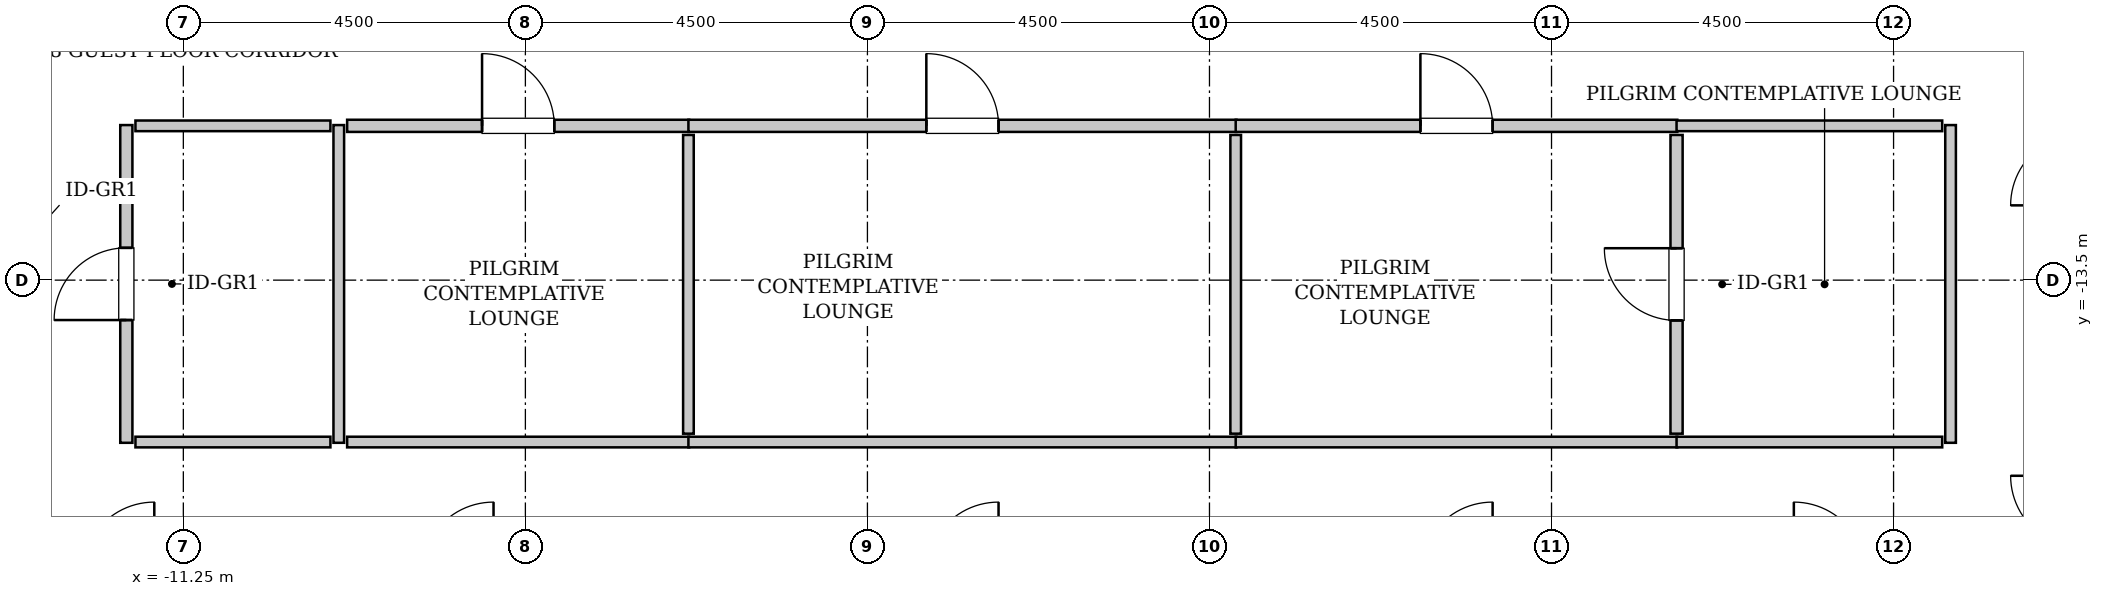
"""IFC4 building model, lengths in metres.
Left out: names, types, materials, properties, quantities, classifications, styles, units other than length and angle.
Written with IfcOpenShell. Run it as: python <this file> out.ifc"""

import sys

from ifc_helpers import new_model, si_unit, direction, frame, frame_2d, origin, place, context, subcontext, project, spatial, rectangle, extrude, source, transform, mapped, element, fill, save


model = new_model("IFC4")
c1 = context("Model", 3, precision=1e-05, world=origin(), true_north=direction((0.0, 1.0)))
c2 = subcontext(c1, "Body", "Model", "MODEL_VIEW")
j1 = project(units=[si_unit("LENGTHUNIT", "METRE"), si_unit("PLANEANGLEUNIT", "RADIAN")], contexts=[c1])
p1 = place(None, origin())
s1 = spatial("IfcSite", under=j1, at=p1, CompositionType="ELEMENT")
p2 = place(p1, origin())
s2 = spatial("IfcBuilding", under=s1, at=p2, CompositionType="ELEMENT")
p3 = place(p2, frame((0.0, 0.0, 156.4)))
s3 = spatial("IfcBuildingStorey", under=s2, at=p3, CompositionType="ELEMENT", Elevation=156.4)
m1 = source(origin(), c2, "Body", "SweptSolid", [
    extrude(rectangle(XDim=4.18, YDim=0.16, at=frame_2d((2.09, 0.0))), origin(), (0.0, 0.0, 1.0), 3.535),
])
p4 = place(p3, frame((-12.0, -15.64, 0.0), z_axis=(0.0, 0.0, 1.0), x_axis=(0.0, 1.0, 0.0)))
e1 = element("IfcWall", 1, at=p4, inside=s3, PredefinedType="PARTITIONING", context=c2, shape_type="MappedRepresentation", body=[
    mapped(m1, transform((0.0, 0.0, 0.0), x_axis=(1.0, 0.0, 0.0), y_axis=(0.0, 1.0, 0.0), z_axis=(0.0, 0.0, 1.0), scale=1.0)),
])
p5 = place(p4, frame((1.615, 0.0, 0.0)))
e2 = element("IfcOpeningElement", 2, at=p5, cuts=e1, PredefinedType="OPENING", context=c2, shape_type="SweptSolid", body=[
    extrude(rectangle(XDim=0.95, YDim=2.1, at=frame_2d((0.475, 1.05))), frame((0.0, 0.09, 0.0), z_axis=(0.0, -1.0, 0.0), x_axis=(1.0, 0.0, 0.0)), (0.0, 0.0, 1.0), 0.18),
])
m2 = source(origin(), c2, "Body", "SweptSolid", [
    extrude(rectangle(XDim=4.18, YDim=0.14, at=frame_2d((2.09, 0.0))), origin(), (0.0, 0.0, 1.0), 3.535),
])
p6 = place(p3, frame((-9.205, -15.64, 0.0), z_axis=(0.0, 0.0, 1.0), x_axis=(0.0, 1.0, 0.0)))
e3 = element("IfcWall", 3, at=p6, inside=s3, PredefinedType="PARTITIONING", context=c2, shape_type="MappedRepresentation", body=[
    mapped(m2, transform((0.0, 0.0, 0.0), x_axis=(1.0, 0.0, 0.0), y_axis=(0.0, 1.0, 0.0), z_axis=(0.0, 0.0, 1.0), scale=1.0)),
])
m3 = source(origin(), c2, "Body", "SweptSolid", [
    extrude(rectangle(XDim=2.565, YDim=0.14, at=frame_2d((1.282, 0.0))), origin(), (0.0, 0.0, 1.0), 3.535),
])
for number, where, z_axis, x_axis in (
    (4, (-11.88, -11.47, 0.0), (0.0, 0.0, 1.0), (1.0, 0.0, 0.0)),
    (5, (-11.88, -15.63, 0.0), (0.0, 0.0, 1.0), (1.0, 0.0, 0.0)),
):
    element("IfcWall", number, at=place(p3, frame(where, z_axis=z_axis, x_axis=x_axis)), inside=s3, PredefinedType="PARTITIONING", context=c2, shape_type="MappedRepresentation", body=[
        mapped(m3, transform((0.0, 0.0, 0.0), x_axis=(1.0, 0.0, 0.0), y_axis=(0.0, 1.0, 0.0), z_axis=(0.0, 0.0, 1.0), scale=1.0)),
    ])
m4 = source(origin(), c2, "Body", "SweptSolid", [
    extrude(rectangle(XDim=4.5, YDim=0.16, at=frame_2d((2.25, 0.0))), origin(), (0.0, 0.0, 1.0), 3.535),
])
p7 = place(p3, frame((-9.095, -11.47, 0.0), z_axis=(0.0, 0.0, 1.0), x_axis=(1.0, 0.0, 0.0)))
e6 = element("IfcWall", 6, at=p7, inside=s3, PredefinedType="PARTITIONING", context=c2, shape_type="MappedRepresentation", body=[
    mapped(m4, transform((0.0, 0.0, 0.0), x_axis=(1.0, 0.0, 0.0), y_axis=(0.0, 1.0, 0.0), z_axis=(0.0, 0.0, 1.0), scale=1.0)),
])
p8 = place(p7, frame((1.775, 0.0, 0.0)))
e7 = element("IfcOpeningElement", 7, at=p8, cuts=e6, PredefinedType="OPENING", context=c2, shape_type="SweptSolid", body=[
    extrude(rectangle(XDim=0.95, YDim=2.1, at=frame_2d((0.475, 1.05))), frame((0.0, 0.09, 0.0), z_axis=(0.0, -1.0, 0.0), x_axis=(1.0, 0.0, 0.0)), (0.0, 0.0, 1.0), 0.18),
])
m5 = source(origin(), c2, "Body", "SweptSolid", [
    extrude(rectangle(XDim=4.5, YDim=0.14, at=frame_2d((2.25, 0.0))), origin(), (0.0, 0.0, 1.0), 3.535),
])
p9 = place(p3, frame((-9.095, -15.63, 0.0), z_axis=(0.0, 0.0, 1.0), x_axis=(1.0, 0.0, 0.0)))
e8 = element("IfcWall", 8, at=p9, inside=s3, PredefinedType="PARTITIONING", context=c2, shape_type="MappedRepresentation", body=[
    mapped(m5, transform((0.0, 0.0, 0.0), x_axis=(1.0, 0.0, 0.0), y_axis=(0.0, 1.0, 0.0), z_axis=(0.0, 0.0, 1.0), scale=1.0)),
])
m6 = source(origin(), c2, "Body", "SweptSolid", [
    extrude(rectangle(XDim=3.93, YDim=0.14, at=frame_2d((1.965, 0.0))), origin(), (0.0, 0.0, 1.0), 3.535),
])
p10 = place(p3, frame((-4.605, -15.52, 0.0), z_axis=(0.0, 0.0, 1.0), x_axis=(0.0, 1.0, 0.0)))
e9 = element("IfcWall", 9, at=p10, inside=s3, PredefinedType="PARTITIONING", context=c2, shape_type="MappedRepresentation", body=[
    mapped(m6, transform((0.0, 0.0, 0.0), x_axis=(1.0, 0.0, 0.0), y_axis=(0.0, 1.0, 0.0), z_axis=(0.0, 0.0, 1.0), scale=1.0)),
])
m7 = source(origin(), c2, "Body", "SweptSolid", [
    extrude(rectangle(XDim=7.21, YDim=0.16, at=frame_2d((3.605, 0.0))), origin(), (0.0, 0.0, 1.0), 3.535),
])
p11 = place(p3, frame((-4.605, -11.47, 0.0), z_axis=(0.0, 0.0, 1.0), x_axis=(1.0, 0.0, 0.0)))
e10 = element("IfcWall", 10, at=p11, inside=s3, PredefinedType="PARTITIONING", context=c2, shape_type="MappedRepresentation", body=[
    mapped(m7, transform((0.0, 0.0, 0.0), x_axis=(1.0, 0.0, 0.0), y_axis=(0.0, 1.0, 0.0), z_axis=(0.0, 0.0, 1.0), scale=1.0)),
])
p12 = place(p11, frame((3.13, 0.0, 0.0)))
e11 = element("IfcOpeningElement", 11, at=p12, cuts=e10, PredefinedType="OPENING", context=c2, shape_type="SweptSolid", body=[
    extrude(rectangle(XDim=0.95, YDim=2.1, at=frame_2d((0.475, 1.05))), frame((0.0, 0.09, 0.0), z_axis=(0.0, -1.0, 0.0), x_axis=(1.0, 0.0, 0.0)), (0.0, 0.0, 1.0), 0.18),
])
m8 = source(origin(), c2, "Body", "SweptSolid", [
    extrude(rectangle(XDim=7.21, YDim=0.14, at=frame_2d((3.605, 0.0))), origin(), (0.0, 0.0, 1.0), 3.535),
])
p13 = place(p3, frame((-4.605, -15.63, 0.0), z_axis=(0.0, 0.0, 1.0), x_axis=(1.0, 0.0, 0.0)))
e12 = element("IfcWall", 12, at=p13, inside=s3, PredefinedType="PARTITIONING", context=c2, shape_type="MappedRepresentation", body=[
    mapped(m8, transform((0.0, 0.0, 0.0), x_axis=(1.0, 0.0, 0.0), y_axis=(0.0, 1.0, 0.0), z_axis=(0.0, 0.0, 1.0), scale=1.0)),
])
p14 = place(p3, frame((2.595, -15.52, 0.0), z_axis=(0.0, 0.0, 1.0), x_axis=(0.0, 1.0, 0.0)))
e13 = element("IfcWall", 13, at=p14, inside=s3, PredefinedType="PARTITIONING", context=c2, shape_type="MappedRepresentation", body=[
    mapped(m6, transform((0.0, 0.0, 0.0), x_axis=(1.0, 0.0, 0.0), y_axis=(0.0, 1.0, 0.0), z_axis=(0.0, 0.0, 1.0), scale=1.0)),
])
m9 = source(origin(), c2, "Body", "SweptSolid", [
    extrude(rectangle(XDim=5.81, YDim=0.16, at=frame_2d((2.905, 0.0))), origin(), (0.0, 0.0, 1.0), 3.535),
])
p15 = place(p3, frame((2.595, -11.47, 0.0), z_axis=(0.0, 0.0, 1.0), x_axis=(1.0, 0.0, 0.0)))
e14 = element("IfcWall", 14, at=p15, inside=s3, PredefinedType="PARTITIONING", context=c2, shape_type="MappedRepresentation", body=[
    mapped(m9, transform((0.0, 0.0, 0.0), x_axis=(1.0, 0.0, 0.0), y_axis=(0.0, 1.0, 0.0), z_axis=(0.0, 0.0, 1.0), scale=1.0)),
])
p16 = place(p15, frame((2.43, 0.0, 0.0)))
e15 = element("IfcOpeningElement", 15, at=p16, cuts=e14, PredefinedType="OPENING", context=c2, shape_type="SweptSolid", body=[
    extrude(rectangle(XDim=0.95, YDim=2.1, at=frame_2d((0.475, 1.05))), frame((0.0, 0.09, 0.0), z_axis=(0.0, -1.0, 0.0), x_axis=(1.0, 0.0, 0.0)), (0.0, 0.0, 1.0), 0.18),
])
m10 = source(origin(), c2, "Body", "SweptSolid", [
    extrude(rectangle(XDim=5.81, YDim=0.14, at=frame_2d((2.905, 0.0))), origin(), (0.0, 0.0, 1.0), 3.535),
])
p17 = place(p3, frame((2.595, -15.63, 0.0), z_axis=(0.0, 0.0, 1.0), x_axis=(1.0, 0.0, 0.0)))
e16 = element("IfcWall", 16, at=p17, inside=s3, PredefinedType="PARTITIONING", context=c2, shape_type="MappedRepresentation", body=[
    mapped(m10, transform((0.0, 0.0, 0.0), x_axis=(1.0, 0.0, 0.0), y_axis=(0.0, 1.0, 0.0), z_axis=(0.0, 0.0, 1.0), scale=1.0)),
])
m11 = source(origin(), c2, "Body", "SweptSolid", [
    extrude(rectangle(XDim=3.93, YDim=0.16, at=frame_2d((1.965, 0.0))), origin(), (0.0, 0.0, 1.0), 3.535),
])
p18 = place(p3, frame((8.395, -15.52, 0.0), z_axis=(0.0, 0.0, 1.0), x_axis=(0.0, 1.0, 0.0)))
e17 = element("IfcWall", 17, at=p18, inside=s3, PredefinedType="PARTITIONING", context=c2, shape_type="MappedRepresentation", body=[
    mapped(m11, transform((0.0, 0.0, 0.0), x_axis=(1.0, 0.0, 0.0), y_axis=(0.0, 1.0, 0.0), z_axis=(0.0, 0.0, 1.0), scale=1.0)),
])
p19 = place(p18, frame((1.49, 0.0, 0.0)))
e18 = element("IfcOpeningElement", 18, at=p19, cuts=e17, PredefinedType="OPENING", context=c2, shape_type="SweptSolid", body=[
    extrude(rectangle(XDim=0.95, YDim=2.1, at=frame_2d((0.475, 1.05))), frame((0.0, 0.09, 0.0), z_axis=(0.0, -1.0, 0.0), x_axis=(1.0, 0.0, 0.0)), (0.0, 0.0, 1.0), 0.18),
])
p20 = place(p3, frame((12.0, -15.64, 0.0), z_axis=(0.0, 0.0, 1.0), x_axis=(0.0, 1.0, 0.0)))
e19 = element("IfcWall", 19, at=p20, inside=s3, PredefinedType="PARTITIONING", context=c2, shape_type="MappedRepresentation", body=[
    mapped(m2, transform((0.0, 0.0, 0.0), x_axis=(1.0, 0.0, 0.0), y_axis=(0.0, 1.0, 0.0), z_axis=(0.0, 0.0, 1.0), scale=1.0)),
])
m12 = source(origin(), c2, "Body", "SweptSolid", [
    extrude(rectangle(XDim=3.495, YDim=0.14, at=frame_2d((1.748, 0.0))), origin(), (0.0, 0.0, 1.0), 3.535),
])
for number, where, z_axis, x_axis in (
    (20, (8.395, -11.47, 0.0), (0.0, 0.0, 1.0), (1.0, 0.0, 0.0)),
    (21, (8.395, -15.63, 0.0), (0.0, 0.0, 1.0), (1.0, 0.0, 0.0)),
):
    element("IfcWall", number, at=place(p3, frame(where, z_axis=z_axis, x_axis=x_axis)), inside=s3, PredefinedType="PARTITIONING", context=c2, shape_type="MappedRepresentation", body=[
        mapped(m12, transform((0.0, 0.0, 0.0), x_axis=(1.0, 0.0, 0.0), y_axis=(0.0, 1.0, 0.0), z_axis=(0.0, 0.0, 1.0), scale=1.0)),
    ])
m13 = source(origin(), c2, "Body", "SweptSolid", [
    extrude(rectangle(XDim=0.95, YDim=2.1, at=frame_2d((0.475, 1.05))), frame((0.0, 0.025, 0.0), z_axis=(0.0, -1.0, 0.0), x_axis=(1.0, 0.0, 0.0)), (0.0, 0.0, 1.0), 0.05),
])
p21 = place(p5, origin())
e22 = element("IfcDoor", 22, at=p21, inside=s3, OperationType="SINGLE_SWING_LEFT", PredefinedType="DOOR", context=c2, shape_type="MappedRepresentation", body=[
    mapped(m13, transform((0.0, 0.0, 0.0), x_axis=(1.0, 0.0, 0.0), y_axis=(0.0, 1.0, 0.0), z_axis=(0.0, 0.0, 1.0), scale=1.0)),
])
fill(e2, e22)
p22 = place(p8, origin())
e23 = element("IfcDoor", 23, at=p22, inside=s3, OperationType="SINGLE_SWING_LEFT", PredefinedType="DOOR", context=c2, shape_type="MappedRepresentation", body=[
    mapped(m13, transform((0.0, 0.0, 0.0), x_axis=(1.0, 0.0, 0.0), y_axis=(0.0, 1.0, 0.0), z_axis=(0.0, 0.0, 1.0), scale=1.0)),
])
fill(e7, e23)
p23 = place(p12, origin())
e24 = element("IfcDoor", 24, at=p23, inside=s3, OperationType="SINGLE_SWING_LEFT", PredefinedType="DOOR", context=c2, shape_type="MappedRepresentation", body=[
    mapped(m13, transform((0.0, 0.0, 0.0), x_axis=(1.0, 0.0, 0.0), y_axis=(0.0, 1.0, 0.0), z_axis=(0.0, 0.0, 1.0), scale=1.0)),
])
fill(e11, e24)
p24 = place(p16, origin())
e25 = element("IfcDoor", 25, at=p24, inside=s3, OperationType="SINGLE_SWING_LEFT", PredefinedType="DOOR", context=c2, shape_type="MappedRepresentation", body=[
    mapped(m13, transform((0.0, 0.0, 0.0), x_axis=(1.0, 0.0, 0.0), y_axis=(0.0, 1.0, 0.0), z_axis=(0.0, 0.0, 1.0), scale=1.0)),
])
fill(e15, e25)
p25 = place(p19, origin())
e26 = element("IfcDoor", 26, at=p25, inside=s3, OperationType="SINGLE_SWING_RIGHT", PredefinedType="DOOR", context=c2, shape_type="MappedRepresentation", body=[
    mapped(m13, transform((0.0, 0.0, 0.0), x_axis=(1.0, 0.0, 0.0), y_axis=(0.0, 1.0, 0.0), z_axis=(0.0, 0.0, 1.0), scale=1.0)),
])
fill(e18, e26)
save(model, sys.argv[1])
